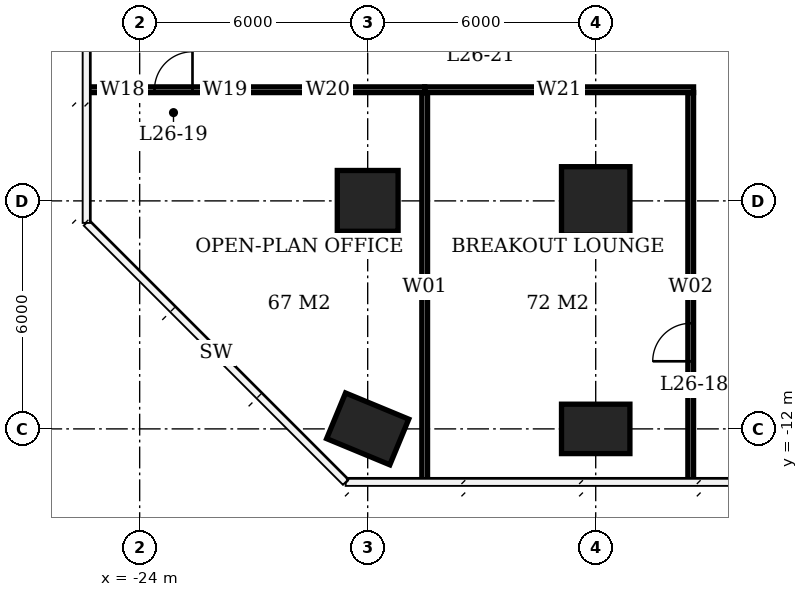
"""IFC4 building model, lengths in metres.
Left out: names, types, materials, properties, quantities, classifications, styles, units other than length and angle.
Written with IfcOpenShell. Run it as: python <this file> out.ifc"""

import sys

from ifc_helpers import new_model, si_unit, direction, frame, frame_2d, origin, origin_2d, place, context, subcontext, project, spatial, rectangle, extrude, element, fill, save


model = new_model("IFC4")
c1 = context("Model", 3, precision=1e-05, world=origin(), true_north=direction((0.0, 1.0)))
c2 = subcontext(c1, "Body", "Model", "MODEL_VIEW")
j1 = project(units=[si_unit("LENGTHUNIT", "METRE"), si_unit("PLANEANGLEUNIT", "RADIAN")], contexts=[c1])
p1 = place(None, origin())
s1 = spatial("IfcSite", under=j1, at=p1, CompositionType="ELEMENT")
p2 = place(p1, origin())
s2 = spatial("IfcBuilding", under=s1, at=p2, CompositionType="ELEMENT")
p3 = place(p2, frame((0.0, 0.0, 109.4)))
s3 = spatial("IfcBuildingStorey", under=s2, at=p3, CompositionType="ELEMENT", Elevation=109.4)
p4 = place(p3, frame((-18.0, -12.0, 0.0), z_axis=(0.0, 0.0, 1.0), x_axis=(-0.923879532511, 0.382683432365, 0.0)))
e1 = element("IfcColumn", 1, at=p4, inside=s3, PredefinedType="COLUMN", context=c2, shape_type="SweptSolid", body=[
    extrude(rectangle(XDim=1.8, YDim=1.3, at=origin_2d()), origin(), (0.0, 0.0, 1.0), 3.9),
])
p5 = place(p3, frame((-18.0, -6.0, 0.0), z_axis=(0.0, 0.0, 1.0), x_axis=(1.0, 0.0, 0.0)))
e2 = element("IfcColumn", 2, at=p5, inside=s3, PredefinedType="COLUMN", context=c2, shape_type="SweptSolid", body=[
    extrude(rectangle(XDim=1.6, YDim=1.6, at=origin_2d()), origin(), (0.0, 0.0, 1.0), 3.9),
])
p6 = place(p3, frame((-12.0, -12.0, 0.0), z_axis=(0.0, 0.0, 1.0), x_axis=(1.0, 0.0, 0.0)))
e3 = element("IfcColumn", 3, at=p6, inside=s3, PredefinedType="COLUMN", context=c2, shape_type="SweptSolid", body=[
    extrude(rectangle(XDim=1.8, YDim=1.3, at=origin_2d()), origin(), (0.0, 0.0, 1.0), 3.9),
])
p7 = place(p3, frame((-12.0, -6.0, 0.0), z_axis=(0.0, 0.0, 1.0), x_axis=(1.0, 0.0, 0.0)))
e4 = element("IfcColumn", 4, at=p7, inside=s3, PredefinedType="COLUMN", context=c2, shape_type="SweptSolid", body=[
    extrude(rectangle(XDim=1.8, YDim=1.8, at=origin_2d()), origin(), (0.0, 0.0, 1.0), 3.9),
])
p8 = place(p3, frame((-25.4, -3.075, 0.0), z_axis=(0.0, 0.0, 1.0), x_axis=(1.0, 0.0, 0.0)))
e5 = element("IfcWall", 5, at=p8, inside=s3, PredefinedType="PARTITIONING", context=c2, shape_type="SweptSolid", body=[
    extrude(rectangle(XDim=3.09, YDim=0.15, at=frame_2d((1.545, 0.0))), origin(), (0.0, 0.0, 1.0), 3.65),
])
p9 = place(p8, frame((1.79, 0.0, 0.0)))
e6 = element("IfcOpeningElement", 6, at=p9, cuts=e5, PredefinedType="OPENING", context=c2, shape_type="SweptSolid", body=[
    extrude(rectangle(XDim=1.0, YDim=2.1, at=frame_2d((0.5, 1.05))), frame((0.0, 0.085, 0.0), z_axis=(0.0, -1.0, 0.0), x_axis=(1.0, 0.0, 0.0)), (0.0, 0.0, 1.0), 0.17),
])
p10 = place(p3, frame((-22.31, -3.075, 0.0), z_axis=(0.0, 0.0, 1.0), x_axis=(1.0, 0.0, 0.0)))
e7 = element("IfcWall", 7, at=p10, inside=s3, PredefinedType="PARTITIONING", context=c2, shape_type="SweptSolid", body=[
    extrude(rectangle(XDim=0.72, YDim=0.15, at=frame_2d((0.36, 0.0))), origin(), (0.0, 0.0, 1.0), 2.65),
])
p11 = place(p3, frame((-21.59, -3.075, 0.0), z_axis=(0.0, 0.0, 1.0), x_axis=(1.0, 0.0, 0.0)))
e8 = element("IfcWall", 8, at=p11, inside=s3, PredefinedType="PARTITIONING", context=c2, shape_type="SweptSolid", body=[
    extrude(rectangle(XDim=5.09, YDim=0.15, at=frame_2d((2.545, 0.0))), origin(), (0.0, 0.0, 1.0), 3.65),
])
p12 = place(p3, frame((-16.5, -13.4, 0.0), z_axis=(0.0, 0.0, 1.0), x_axis=(0.0, 1.0, 0.0)))
e9 = element("IfcWall", 9, at=p12, inside=s3, PredefinedType="PARTITIONING", context=c2, shape_type="SweptSolid", body=[
    extrude(rectangle(XDim=10.25, YDim=0.15, at=frame_2d((5.125, 0.0))), origin(), (0.0, 0.0, 1.0), 3.65),
])
p13 = place(p3, frame((-16.5, -3.075, 0.0), z_axis=(0.0, 0.0, 1.0), x_axis=(1.0, 0.0, 0.0)))
e10 = element("IfcWall", 10, at=p13, inside=s3, PredefinedType="PARTITIONING", context=c2, shape_type="SweptSolid", body=[
    extrude(rectangle(XDim=7.075, YDim=0.15, at=frame_2d((3.538, 0.0))), origin(), (0.0, 0.0, 1.0), 3.65),
])
p14 = place(p3, frame((-9.5, -13.4, 0.0), z_axis=(0.0, 0.0, 1.0), x_axis=(0.0, 1.0, 0.0)))
e11 = element("IfcWall", 11, at=p14, inside=s3, PredefinedType="PARTITIONING", context=c2, shape_type="SweptSolid", body=[
    extrude(rectangle(XDim=10.25, YDim=0.15, at=frame_2d((5.125, 0.0))), origin(), (0.0, 0.0, 1.0), 3.65),
])
p15 = place(p14, frame((3.179, 0.0, 0.0)))
e12 = element("IfcOpeningElement", 12, at=p15, cuts=e11, PredefinedType="OPENING", context=c2, shape_type="SweptSolid", body=[
    extrude(rectangle(XDim=1.0, YDim=2.1, at=frame_2d((0.5, 1.05))), frame((0.0, 0.085, 0.0), z_axis=(0.0, -1.0, 0.0), x_axis=(1.0, 0.0, 0.0)), (0.0, 0.0, 1.0), 0.17),
])
p16 = place(p15, origin())
e13 = element("IfcDoor", 13, at=p16, inside=s3, OperationType="SINGLE_SWING_LEFT", PredefinedType="DOOR", context=c2, shape_type="SweptSolid", body=[
    extrude(rectangle(XDim=1.0, YDim=2.1, at=frame_2d((0.5, 1.05))), frame((0.0, 0.025, 0.0), z_axis=(0.0, -1.0, 0.0), x_axis=(1.0, 0.0, 0.0)), (0.0, 0.0, 1.0), 0.05),
])
fill(e12, e13)
p17 = place(p9, origin())
e14 = element("IfcDoor", 14, at=p17, inside=s3, OperationType="SINGLE_SWING_RIGHT", PredefinedType="DOOR", context=c2, shape_type="SweptSolid", body=[
    extrude(rectangle(XDim=1.0, YDim=2.1, at=frame_2d((0.5, 1.05))), frame((0.0, 0.025, 0.0), z_axis=(0.0, -1.0, 0.0), x_axis=(1.0, 0.0, 0.0)), (0.0, 0.0, 1.0), 0.05),
])
fill(e6, e14)
save(model, sys.argv[1])
